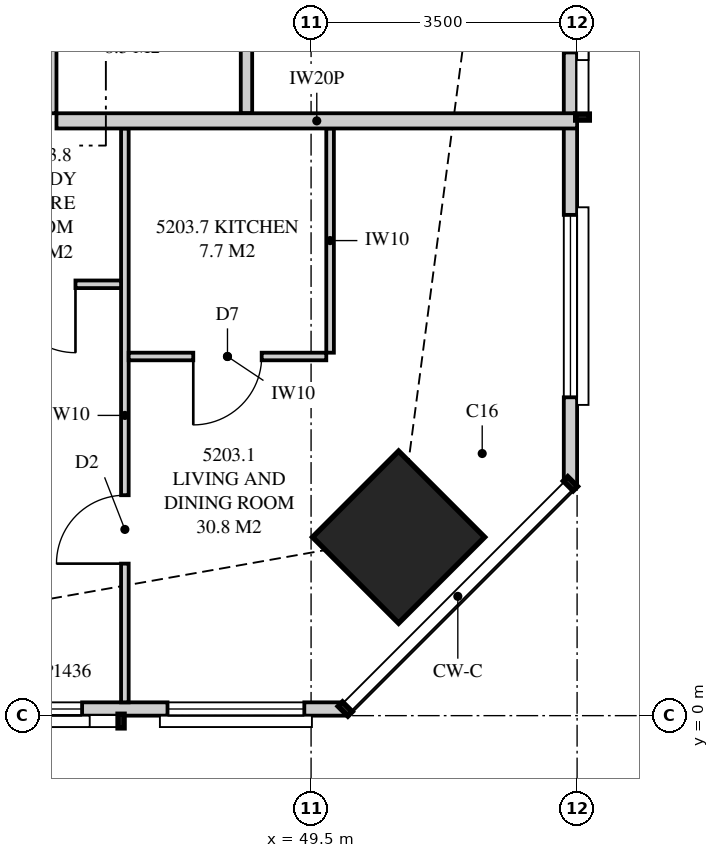
"""IFC4 building model, lengths in metres.
Left out: names, types, materials, properties, quantities, classifications, styles, units other than length and angle.
Written with IfcOpenShell. Run it as: python <this file> out.ifc"""

import sys

from ifc_helpers import new_model, si_unit, direction, frame, frame_2d, origin, origin_2d, place, context, subcontext, project, spatial, polyline, rectangle, outline, extrude, element, fill, save


model = new_model("IFC4")
c1 = context("Model", 3, precision=1e-05, world=origin(), true_north=direction((0.0, 1.0)))
c2 = subcontext(c1, "Body", "Model", "MODEL_VIEW")
j1 = project(units=[si_unit("LENGTHUNIT", "METRE"), si_unit("PLANEANGLEUNIT", "RADIAN")], contexts=[c1])
p1 = place(None, origin())
s1 = spatial("IfcSite", under=j1, at=p1, CompositionType="ELEMENT")
p2 = place(p1, origin())
s2 = spatial("IfcBuilding", under=s1, at=p2, CompositionType="ELEMENT")
p3 = place(p2, frame((0.0, 0.0, 191.2)))
s3 = spatial("IfcBuildingStorey", under=s2, at=p3, CompositionType="ELEMENT", Elevation=191.2)
p4 = place(p3, frame((50.652, 2.348, 0.0), z_axis=(0.0, 0.0, 1.0), x_axis=(0.707106781187, 0.707106781187, 0.0)))
e1 = element("IfcColumn", 1, at=p4, inside=s3, PredefinedType="COLUMN", context=c2, shape_type="SweptSolid", body=[
    extrude(rectangle(XDim=1.6, YDim=1.6, at=origin_2d()), origin(), (0.0, 0.0, 1.0), 3.35),
])
p5 = place(p3, frame((15.051, 0.087, 0.0), z_axis=(0.0, 0.0, 1.0), x_axis=(1.0, 0.0, 0.0)))
e2 = element("IfcWall", 2, at=p5, inside=s3, PredefinedType="SOLIDWALL", context=c2, shape_type="SweptSolid", body=[
    extrude(outline(polyline([(0.0, 0.0), (34.897, 0.0), (34.897, 3.11), (27.91, 3.11), (27.91, 2.15), (27.836, 2.15), (27.836, 3.11), (27.699, 3.11), (27.699, 2.15), (7.199, 2.15), (7.199, 3.11), (7.062, 3.11), (7.062, 2.15), (6.987, 2.15), (6.987, 3.11), (0.0, 3.11), (0.0, 0.0)])), frame((0.0, 0.087, 0.0), z_axis=(0.0, -1.0, 0.0), x_axis=(1.0, 0.0, 0.0)), (0.0, 0.0, 1.0), 0.175),
])
p6 = place(p5, frame((2.84, 0.0, 0.4)))
e3 = element("IfcOpeningElement", 3, at=p6, cuts=e2, PredefinedType="OPENING", context=c2, shape_type="SweptSolid", body=[
    extrude(rectangle(XDim=2.4, YDim=1.7, at=frame_2d((1.2, 0.85))), frame((0.0, 0.097, 0.0), z_axis=(0.0, -1.0, 0.0), x_axis=(1.0, 0.0, 0.0)), (0.0, 0.0, 1.0), 0.195),
])
p7 = place(p5, frame((9.149, 0.0, 0.4)))
e4 = element("IfcOpeningElement", 4, at=p7, cuts=e2, PredefinedType="OPENING", context=c2, shape_type="SweptSolid", body=[
    extrude(rectangle(XDim=1.8, YDim=1.7, at=frame_2d((0.9, 0.85))), frame((0.0, 0.097, 0.0), z_axis=(0.0, -1.0, 0.0), x_axis=(1.0, 0.0, 0.0)), (0.0, 0.0, 1.0), 0.195),
])
p8 = place(p5, frame((13.561, 0.0, 0.0)))
e5 = element("IfcOpeningElement", 5, at=p8, cuts=e2, PredefinedType="OPENING", context=c2, shape_type="SweptSolid", body=[
    extrude(rectangle(XDim=1.8, YDim=2.1, at=frame_2d((0.9, 1.05))), frame((0.0, 0.097, 0.0), z_axis=(0.0, -1.0, 0.0), x_axis=(1.0, 0.0, 0.0)), (0.0, 0.0, 1.0), 0.195),
])
p9 = place(p5, frame((19.849, 0.0, 0.4)))
e6 = element("IfcOpeningElement", 6, at=p9, cuts=e2, PredefinedType="OPENING", context=c2, shape_type="SweptSolid", body=[
    extrude(rectangle(XDim=1.8, YDim=1.7, at=frame_2d((0.9, 0.85))), frame((0.0, 0.097, 0.0), z_axis=(0.0, -1.0, 0.0), x_axis=(1.0, 0.0, 0.0)), (0.0, 0.0, 1.0), 0.195),
])
p10 = place(p5, frame((23.449, 0.0, 0.4)))
e7 = element("IfcOpeningElement", 7, at=p10, cuts=e2, PredefinedType="OPENING", context=c2, shape_type="SweptSolid", body=[
    extrude(rectangle(XDim=1.8, YDim=1.7, at=frame_2d((0.9, 0.85))), frame((0.0, 0.097, 0.0), z_axis=(0.0, -1.0, 0.0), x_axis=(1.0, 0.0, 0.0)), (0.0, 0.0, 1.0), 0.195),
])
p11 = place(p5, frame((29.636, 0.0, 0.4)))
e8 = element("IfcOpeningElement", 8, at=p11, cuts=e2, PredefinedType="OPENING", context=c2, shape_type="SweptSolid", body=[
    extrude(rectangle(XDim=1.8, YDim=1.7, at=frame_2d((0.9, 0.85))), frame((0.0, 0.097, 0.0), z_axis=(0.0, -1.0, 0.0), x_axis=(1.0, 0.0, 0.0)), (0.0, 0.0, 1.0), 0.195),
])
p12 = place(p5, frame((32.56, 0.0, 0.4)))
e9 = element("IfcOpeningElement", 9, at=p12, cuts=e2, PredefinedType="OPENING", context=c2, shape_type="SweptSolid", body=[
    extrude(rectangle(XDim=1.8, YDim=1.7, at=frame_2d((0.9, 0.85))), frame((0.0, 0.097, 0.0), z_axis=(0.0, -1.0, 0.0), x_axis=(1.0, 0.0, 0.0)), (0.0, 0.0, 1.0), 0.195),
])
p13 = place(p3, frame((52.913, 3.051, 0.0), z_axis=(0.0, 0.0, 1.0), x_axis=(0.0, 1.0, 0.0)))
e10 = element("IfcWall", 10, at=p13, inside=s3, PredefinedType="SOLIDWALL", context=c2, shape_type="SweptSolid", body=[
    extrude(outline(polyline([(0.0, 0.0), (29.897, 0.0), (29.897, 3.11), (22.167, 3.11), (22.167, 2.15), (22.074, 2.15), (22.074, 3.11), (21.949, 3.11), (21.949, 2.15), (9.949, 2.15), (9.949, 3.11), (9.847, 3.11), (9.847, 2.15), (9.706, 2.15), (9.706, 3.11), (0.0, 3.11), (0.0, 0.0)])), frame((0.0, 0.087, 0.0), z_axis=(0.0, -1.0, 0.0), x_axis=(1.0, 0.0, 0.0)), (0.0, 0.0, 1.0), 0.175),
])
p14 = place(p13, frame((1.137, 0.0, 0.4)))
e11 = element("IfcOpeningElement", 11, at=p14, cuts=e10, PredefinedType="OPENING", context=c2, shape_type="SweptSolid", body=[
    extrude(rectangle(XDim=2.4, YDim=1.7, at=frame_2d((1.2, 0.85))), frame((0.0, 0.097, 0.0), z_axis=(0.0, -1.0, 0.0), x_axis=(1.0, 0.0, 0.0)), (0.0, 0.0, 1.0), 0.195),
])
p15 = place(p13, frame((5.674, 0.0, 0.4)))
e12 = element("IfcOpeningElement", 12, at=p15, cuts=e10, PredefinedType="OPENING", context=c2, shape_type="SweptSolid", body=[
    extrude(rectangle(XDim=1.8, YDim=1.7, at=frame_2d((0.9, 0.85))), frame((0.0, 0.097, 0.0), z_axis=(0.0, -1.0, 0.0), x_axis=(1.0, 0.0, 0.0)), (0.0, 0.0, 1.0), 0.195),
])
p16 = place(p13, frame((11.902, 0.0, 0.4)))
e13 = element("IfcOpeningElement", 13, at=p16, cuts=e10, PredefinedType="OPENING", context=c2, shape_type="SweptSolid", body=[
    extrude(rectangle(XDim=2.4, YDim=1.7, at=frame_2d((1.2, 0.85))), frame((0.0, 0.097, 0.0), z_axis=(0.0, -1.0, 0.0), x_axis=(1.0, 0.0, 0.0)), (0.0, 0.0, 1.0), 0.195),
])
p17 = place(p13, frame((15.324, 0.0, 0.0)))
e14 = element("IfcOpeningElement", 14, at=p17, cuts=e10, PredefinedType="OPENING", context=c2, shape_type="SweptSolid", body=[
    extrude(rectangle(XDim=1.8, YDim=2.1, at=frame_2d((0.9, 1.05))), frame((0.0, 0.097, 0.0), z_axis=(0.0, -1.0, 0.0), x_axis=(1.0, 0.0, 0.0)), (0.0, 0.0, 1.0), 0.195),
])
p18 = place(p13, frame((23.874, 0.0, 0.4)))
e15 = element("IfcOpeningElement", 15, at=p18, cuts=e10, PredefinedType="OPENING", context=c2, shape_type="SweptSolid", body=[
    extrude(rectangle(XDim=1.8, YDim=1.7, at=frame_2d((0.9, 0.85))), frame((0.0, 0.097, 0.0), z_axis=(0.0, -1.0, 0.0), x_axis=(1.0, 0.0, 0.0)), (0.0, 0.0, 1.0), 0.195),
])
p19 = place(p13, frame((26.871, 0.0, 0.4)))
e16 = element("IfcOpeningElement", 16, at=p19, cuts=e10, PredefinedType="OPENING", context=c2, shape_type="SweptSolid", body=[
    extrude(rectangle(XDim=1.8, YDim=1.7, at=frame_2d((0.9, 0.85))), frame((0.0, 0.097, 0.0), z_axis=(0.0, -1.0, 0.0), x_axis=(1.0, 0.0, 0.0)), (0.0, 0.0, 1.0), 0.195),
])
p20 = place(p3, frame((47.05, 0.175, 0.0), z_axis=(0.0, 0.0, 1.0), x_axis=(0.0, 1.0, 0.0)))
e17 = element("IfcWall", 17, at=p20, inside=s3, PredefinedType="PARTITIONING", context=c2, shape_type="SweptSolid", body=[
    extrude(outline(polyline([(0.0, 0.0), (7.55, 0.0), (7.55, 3.11), (2.409, 3.11), (2.409, 2.15), (0.663, 2.15), (0.663, 3.11), (0.0, 3.11), (0.0, 0.0)])), frame((0.0, 0.05, 0.0), z_axis=(0.0, -1.0, 0.0), x_axis=(1.0, 0.0, 0.0)), (0.0, 0.0, 1.0), 0.1),
])
p21 = place(p20, frame((1.825, 0.0, 0.0)))
e18 = element("IfcOpeningElement", 18, at=p21, cuts=e17, PredefinedType="OPENING", context=c2, shape_type="SweptSolid", body=[
    extrude(rectangle(XDim=0.9, YDim=2.1, at=frame_2d((0.45, 1.05))), frame((0.0, 0.06, 0.0), z_axis=(0.0, -1.0, 0.0), x_axis=(1.0, 0.0, 0.0)), (0.0, 0.0, 1.0), 0.12),
])
p22 = place(p3, frame((47.1, 4.725, 0.0), z_axis=(0.0, 0.0, 1.0), x_axis=(1.0, 0.0, 0.0)))
e19 = element("IfcWall", 19, at=p22, inside=s3, PredefinedType="PARTITIONING", context=c2, shape_type="SweptSolid", body=[
    extrude(rectangle(XDim=2.6, YDim=0.1, at=frame_2d((1.3, 0.0))), origin(), (0.0, 0.0, 1.0), 3.11),
])
p23 = place(p22, frame((0.85, 0.0, 0.0)))
e20 = element("IfcOpeningElement", 20, at=p23, cuts=e19, PredefinedType="OPENING", context=c2, shape_type="SweptSolid", body=[
    extrude(rectangle(XDim=0.9, YDim=2.1, at=frame_2d((0.45, 1.05))), frame((0.0, 0.06, 0.0), z_axis=(0.0, -1.0, 0.0), x_axis=(1.0, 0.0, 0.0)), (0.0, 0.0, 1.0), 0.12),
])
p24 = place(p3, frame((49.75, 4.775, 0.0), z_axis=(0.0, 0.0, 1.0), x_axis=(0.0, 1.0, 0.0)))
e21 = element("IfcWall", 21, at=p24, inside=s3, PredefinedType="PARTITIONING", context=c2, shape_type="SweptSolid", body=[
    extrude(rectangle(XDim=2.95, YDim=0.1, at=frame_2d((1.475, 0.0))), origin(), (0.0, 0.0, 1.0), 3.11),
])
p25 = place(p3, frame((46.15, 7.825, 0.0), z_axis=(0.0, 0.0, 1.0), x_axis=(1.0, 0.0, 0.0)))
e22 = element("IfcWall", 22, at=p25, inside=s3, PredefinedType="PARTITIONING", context=c2, shape_type="SweptSolid", body=[
    extrude(outline(polyline([(0.0, 0.0), (6.85, 0.0), (6.85, 3.11), (6.138, 3.11), (6.138, 2.15), (4.303, 2.15), (4.303, 3.11), (0.0, 3.11), (0.0, 0.0)])), frame((0.0, 0.1, 0.0), z_axis=(0.0, -1.0, 0.0), x_axis=(1.0, 0.0, 0.0)), (0.0, 0.0, 1.0), 0.2),
])
p26 = place(p3, frame((46.05, 7.925, 0.0), z_axis=(0.0, 0.0, 1.0), x_axis=(0.0, 1.0, 0.0)))
e23 = element("IfcWall", 23, at=p26, inside=s3, PredefinedType="PARTITIONING", context=c2, shape_type="SweptSolid", body=[
    extrude(outline(polyline([(0.0, 0.0), (13.775, 0.0), (13.775, 3.11), (5.412, 3.11), (5.412, 2.541), (4.738, 2.541), (4.738, 3.11), (0.0, 3.11), (0.0, 0.0)])), frame((0.0, 0.1, 0.0), z_axis=(0.0, -1.0, 0.0), x_axis=(1.0, 0.0, 0.0)), (0.0, 0.0, 1.0), 0.2),
])
p27 = place(p26, frame((6.387, 0.0, 0.0)))
e24 = element("IfcOpeningElement", 24, at=p27, cuts=e23, PredefinedType="OPENING", context=c2, shape_type="SweptSolid", body=[
    extrude(rectangle(XDim=1.05, YDim=2.2, at=frame_2d((0.525, 1.1))), frame((0.0, 0.11, 0.0), z_axis=(0.0, -1.0, 0.0), x_axis=(1.0, 0.0, 0.0)), (0.0, 0.0, 1.0), 0.22),
])
p28 = place(p3, frame((48.65, 7.925, 0.0), z_axis=(0.0, 0.0, 1.0), x_axis=(0.0, 1.0, 0.0)))
e25 = element("IfcWall", 25, at=p28, inside=s3, PredefinedType="PLUMBINGWALL", context=c2, shape_type="SweptSolid", body=[
    extrude(rectangle(XDim=3.45, YDim=0.15, at=frame_2d((1.725, 0.0))), origin(), (0.0, 0.0, 1.0), 3.11),
])
p29 = place(p28, frame((2.15, 0.0, 0.0)))
e26 = element("IfcOpeningElement", 26, at=p29, cuts=e25, PredefinedType="OPENING", context=c2, shape_type="SweptSolid", body=[
    extrude(rectangle(XDim=0.9, YDim=2.1, at=frame_2d((0.45, 1.05))), frame((0.0, 0.085, 0.0), z_axis=(0.0, -1.0, 0.0), x_axis=(1.0, 0.0, 0.0)), (0.0, 0.0, 1.0), 0.17),
])
p30 = place(p3, frame((47.0, 5.675, 0.0), z_axis=(0.0, 0.0, 1.0), x_axis=(-1.0, 0.0, 0.0)))
e27 = element("IfcWall", 27, at=p30, inside=s3, PredefinedType="PARTITIONING", context=c2, shape_type="SweptSolid", body=[
    extrude(rectangle(XDim=2.1, YDim=0.1, at=frame_2d((1.05, 0.0))), origin(), (0.0, 0.0, 1.0), 3.11),
])
p31 = place(p30, frame((0.6, 0.0, 0.0)))
e28 = element("IfcOpeningElement", 28, at=p31, cuts=e27, PredefinedType="OPENING", context=c2, shape_type="SweptSolid", body=[
    extrude(rectangle(XDim=0.9, YDim=2.1, at=frame_2d((0.45, 1.05))), frame((0.0, 0.06, 0.0), z_axis=(0.0, -1.0, 0.0), x_axis=(1.0, 0.0, 0.0)), (0.0, 0.0, 1.0), 0.12),
])
p32 = place(p11, origin())
e29 = element("IfcWindow", 29, at=p32, inside=s3, PartitioningType="SINGLE_PANEL", PredefinedType="WINDOW", context=c2, shape_type="SweptSolid", body=[
    extrude(rectangle(XDim=1.8, YDim=1.7, at=frame_2d((0.9, 0.85))), frame((0.0, 0.03, 0.0), z_axis=(0.0, -1.0, 0.0), x_axis=(1.0, 0.0, 0.0)), (0.0, 0.0, 1.0), 0.06),
])
fill(e8, e29)
p33 = place(p12, origin())
e30 = element("IfcWindow", 30, at=p33, inside=s3, PartitioningType="SINGLE_PANEL", PredefinedType="WINDOW", context=c2, shape_type="SweptSolid", body=[
    extrude(rectangle(XDim=1.8, YDim=1.7, at=frame_2d((0.9, 0.85))), frame((0.0, 0.03, 0.0), z_axis=(0.0, -1.0, 0.0), x_axis=(1.0, 0.0, 0.0)), (0.0, 0.0, 1.0), 0.06),
])
fill(e9, e30)
p34 = place(p14, origin())
e31 = element("IfcWindow", 31, at=p34, inside=s3, PartitioningType="SINGLE_PANEL", PredefinedType="WINDOW", context=c2, shape_type="SweptSolid", body=[
    extrude(rectangle(XDim=2.4, YDim=1.7, at=frame_2d((1.2, 0.85))), frame((0.0, 0.03, 0.0), z_axis=(0.0, -1.0, 0.0), x_axis=(1.0, 0.0, 0.0)), (0.0, 0.0, 1.0), 0.06),
])
fill(e11, e31)
p35 = place(p15, origin())
e32 = element("IfcWindow", 32, at=p35, inside=s3, PartitioningType="SINGLE_PANEL", PredefinedType="WINDOW", context=c2, shape_type="SweptSolid", body=[
    extrude(rectangle(XDim=1.8, YDim=1.7, at=frame_2d((0.9, 0.85))), frame((0.0, 0.03, 0.0), z_axis=(0.0, -1.0, 0.0), x_axis=(1.0, 0.0, 0.0)), (0.0, 0.0, 1.0), 0.06),
])
fill(e12, e32)
p36 = place(p21, origin())
e33 = element("IfcDoor", 33, at=p36, inside=s3, OperationType="SINGLE_SWING_LEFT", PredefinedType="DOOR", context=c2, shape_type="SweptSolid", body=[
    extrude(rectangle(XDim=0.9, YDim=2.1, at=frame_2d((0.45, 1.05))), frame((0.0, 0.025, 0.0), z_axis=(0.0, -1.0, 0.0), x_axis=(1.0, 0.0, 0.0)), (0.0, 0.0, 1.0), 0.05),
])
fill(e18, e33)
p37 = place(p23, frame((0.9, 0.0, 0.0), z_axis=(0.0, 0.0, 1.0), x_axis=(-1.0, 0.0, 0.0)))
e34 = element("IfcDoor", 34, at=p37, inside=s3, OperationType="SINGLE_SWING_RIGHT", PredefinedType="DOOR", context=c2, shape_type="SweptSolid", body=[
    extrude(rectangle(XDim=0.9, YDim=2.1, at=frame_2d((0.45, 1.05))), frame((0.0, 0.025, 0.0), z_axis=(0.0, -1.0, 0.0), x_axis=(1.0, 0.0, 0.0)), (0.0, 0.0, 1.0), 0.05),
])
fill(e20, e34)
p38 = place(p31, origin())
e35 = element("IfcDoor", 35, at=p38, inside=s3, OperationType="SINGLE_SWING_LEFT", PredefinedType="DOOR", context=c2, shape_type="SweptSolid", body=[
    extrude(rectangle(XDim=0.9, YDim=2.1, at=frame_2d((0.45, 1.05))), frame((0.0, 0.025, 0.0), z_axis=(0.0, -1.0, 0.0), x_axis=(1.0, 0.0, 0.0)), (0.0, 0.0, 1.0), 0.05),
])
fill(e28, e35)
save(model, sys.argv[1])
